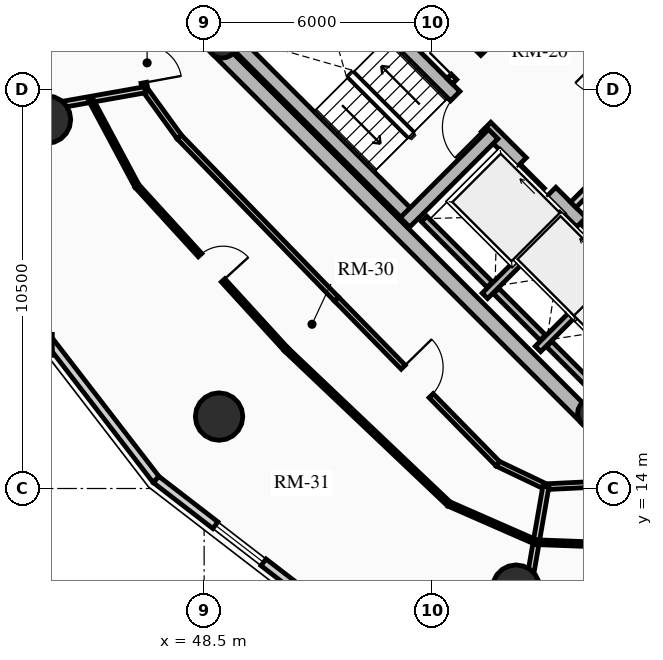
"""IFC4 building model, lengths in metres.
Left out: names, types, materials, properties, quantities, classifications, styles, units other than length and angle.
Written with IfcOpenShell. Run it as: python <this file> out.ifc"""

import sys

from ifc_helpers import new_model, si_unit, direction, frame, frame_2d, origin, origin_2d, place, context, subcontext, project, spatial, rectangle, circle, hollow_circle, extrude, source, transform, mapped, element, fill, save


model = new_model("IFC4")
c1 = context("Model", 3, precision=1e-05, world=origin(), true_north=direction((0.0, 1.0)))
c2 = subcontext(c1, "Body", "Model", "MODEL_VIEW")
j1 = project(units=[si_unit("LENGTHUNIT", "METRE"), si_unit("PLANEANGLEUNIT", "RADIAN")], contexts=[c1])
p1 = place(None, origin())
s1 = spatial("IfcSite", under=j1, at=p1, CompositionType="ELEMENT")
p2 = place(p1, origin())
s2 = spatial("IfcBuilding", under=s1, at=p2, CompositionType="ELEMENT")
p3 = place(p2, frame((0.0, 0.0, 160.33)))
s3 = spatial("IfcBuildingStorey", under=s2, at=p3, CompositionType="ELEMENT", Elevation=160.33)
for number, where, z_axis, x_axis in (
    (1, (58.702, 15.732, 0.0), (0.0, 0.0, 1.0), (-0.707, 0.707, 0.0)),
    (2, (66.268, 23.298, 0.0), (0.0, 0.0, 1.0), (-0.707, 0.707, 0.0)),
):
    element("IfcWall", number, at=place(p3, frame(where, z_axis=z_axis, x_axis=x_axis)), inside=s3, PredefinedType="SHEAR", context=c2, shape_type="SweptSolid", body=[
        extrude(rectangle(XDim=14.1, YDim=0.4, at=frame_2d((7.05, 0.0))), origin(), (0.0, 0.0, 1.0), 2.91),
    ])
p4 = place(p3, frame((58.561, 15.873, 0.0), z_axis=(0.0, 0.0, 1.0), x_axis=(0.707106781187, 0.707106781187, 0.0)))
e3 = element("IfcWall", 3, at=p4, inside=s3, PredefinedType="SHEAR", context=c2, shape_type="SweptSolid", body=[
    extrude(rectangle(XDim=10.7, YDim=0.4, at=frame_2d((5.35, 0.0))), origin(), (0.0, 0.0, 1.0), 2.91),
])
m1 = source(origin(), c2, "Body", "SweptSolid", [
    extrude(rectangle(XDim=1.5, YDim=2.02, at=frame_2d((0.75, 1.01))), frame((0.0, 0.21, 0.0), z_axis=(0.0, -1.0, 0.0), x_axis=(1.0, 0.0, 0.0)), (0.0, 0.0, 1.0), 0.42),
])
p5 = place(p4, frame((5.45, 0.0, 0.0)))
e4 = element("IfcOpeningElement", 4, at=p5, cuts=e3, PredefinedType="OPENING", context=c2, shape_type="MappedRepresentation", body=[
    mapped(m1, transform((0.0, 0.0, 0.0), x_axis=(1.0, 0.0, 0.0), y_axis=(0.0, 1.0, 0.0), z_axis=(0.0, 0.0, 1.0), scale=1.0)),
])
p6 = place(p3, frame((48.873, 25.561, 0.0), z_axis=(0.0, 0.0, 1.0), x_axis=(0.707106781187, 0.707106781187, 0.0)))
e5 = element("IfcWall", 5, at=p6, inside=s3, PredefinedType="SHEAR", context=c2, shape_type="SweptSolid", body=[
    extrude(rectangle(XDim=10.7, YDim=0.4, at=frame_2d((5.35, 0.0))), origin(), (0.0, 0.0, 1.0), 2.91),
])
p7 = place(p6, frame((4.6, 0.0, 0.0)))
e6 = element("IfcOpeningElement", 6, at=p7, cuts=e5, PredefinedType="OPENING", context=c2, shape_type="MappedRepresentation", body=[
    mapped(m1, transform((0.0, 0.0, 0.0), x_axis=(1.0, 0.0, 0.0), y_axis=(0.0, 1.0, 0.0), z_axis=(0.0, 0.0, 1.0), scale=1.0)),
])
p8 = place(p3, frame((61.06, 18.373, 0.0), z_axis=(0.0, 0.0, 1.0), x_axis=(-0.707106781187, 0.707106781187, 0.0)))
e7 = element("IfcWall", 7, at=p8, inside=s3, PredefinedType="SHEAR", context=c2, shape_type="SweptSolid", body=[
    extrude(rectangle(XDim=13.7, YDim=0.35, at=frame_2d((6.85, 0.0))), origin(), (0.0, 0.0, 1.0), 2.91),
])
m2 = source(origin(), c2, "Body", "SweptSolid", [
    extrude(rectangle(XDim=1.1, YDim=2.015, at=frame_2d((0.55, 1.007))), frame((0.0, 0.185, 0.0), z_axis=(0.0, -1.0, 0.0), x_axis=(1.0, 0.0, 0.0)), (0.0, 0.0, 1.0), 0.37),
])
p9 = place(p8, frame((4.85, 0.0, 0.0)))
e8 = element("IfcOpeningElement", 8, at=p9, cuts=e7, PredefinedType="OPENING", context=c2, shape_type="MappedRepresentation", body=[
    mapped(m2, transform((0.0, 0.0, 0.0), x_axis=(1.0, 0.0, 0.0), y_axis=(0.0, 1.0, 0.0), z_axis=(0.0, 0.0, 1.0), scale=1.0)),
])
p10 = place(p8, frame((0.625, 0.0, 0.0)))
e9 = element("IfcOpeningElement", 9, at=p10, cuts=e7, PredefinedType="OPENING", context=c2, shape_type="MappedRepresentation", body=[
    mapped(m2, transform((0.0, 0.0, 0.0), x_axis=(1.0, 0.0, 0.0), y_axis=(0.0, 1.0, 0.0), z_axis=(0.0, 0.0, 1.0), scale=1.0)),
])
p11 = place(p8, frame((2.625, 0.0, 0.0)))
e10 = element("IfcOpeningElement", 10, at=p11, cuts=e7, PredefinedType="OPENING", context=c2, shape_type="MappedRepresentation", body=[
    mapped(m2, transform((0.0, 0.0, 0.0), x_axis=(1.0, 0.0, 0.0), y_axis=(0.0, 1.0, 0.0), z_axis=(0.0, 0.0, 1.0), scale=1.0)),
])
m3 = source(origin(), c2, "Body", "SweptSolid", [
    extrude(rectangle(XDim=1.15, YDim=2.02, at=frame_2d((0.575, 1.01))), frame((0.0, 0.185, 0.0), z_axis=(0.0, -1.0, 0.0), x_axis=(1.0, 0.0, 0.0)), (0.0, 0.0, 1.0), 0.37),
])
p12 = place(p8, frame((7.27, 0.0, 0.0)))
e11 = element("IfcOpeningElement", 11, at=p12, cuts=e7, PredefinedType="OPENING", context=c2, shape_type="MappedRepresentation", body=[
    mapped(m3, transform((0.0, 0.0, 0.0), x_axis=(1.0, 0.0, 0.0), y_axis=(0.0, 1.0, 0.0), z_axis=(0.0, 0.0, 1.0), scale=1.0)),
])
p13 = place(p3, frame((63.627, 20.94, 0.0), z_axis=(0.0, 0.0, 1.0), x_axis=(-0.707119496762, 0.707094065383, 0.0)))
e12 = element("IfcWall", 12, at=p13, inside=s3, PredefinedType="SHEAR", context=c2, shape_type="SweptSolid", body=[
    extrude(rectangle(XDim=9.6, YDim=0.35, at=frame_2d((4.8, 0.0))), origin(), (0.0, 0.0, 1.0), 2.91),
])
p14 = place(p13, frame((5.28, 0.0, 0.0)))
e13 = element("IfcOpeningElement", 13, at=p14, cuts=e12, PredefinedType="OPENING", context=c2, shape_type="MappedRepresentation", body=[
    mapped(m3, transform((0.0, 0.0, 0.0), x_axis=(1.0, 0.0, 0.0), y_axis=(0.0, 1.0, 0.0), z_axis=(0.0, 0.0, 1.0), scale=1.0)),
])
p15 = place(p3, frame((53.922, 21.141, 0.0), z_axis=(0.0, 0.0, 1.0), x_axis=(-0.707106781187, 0.707106781187, 0.0)))
e14 = element("IfcWall", 14, at=p15, inside=s3, PredefinedType="SHEAR", context=c2, shape_type="SweptSolid", body=[
    extrude(rectangle(XDim=6.695, YDim=0.35, at=frame_2d((3.348, 0.0))), origin(), (0.0, 0.0, 1.0), 2.91),
])
p16 = place(p3, frame((53.784, 21.003, 0.0), z_axis=(0.0, 0.0, 1.0), x_axis=(0.707106781187, 0.707106781187, 0.0)))
e15 = element("IfcWall", 15, at=p16, inside=s3, PredefinedType="SHEAR", context=c2, shape_type="SweptSolid", body=[
    extrude(rectangle(XDim=3.285, YDim=0.35, at=frame_2d((1.643, 0.0))), origin(), (0.0, 0.0, 1.0), 2.91),
])
for number, where, z_axis, x_axis in (
    (16, (58.706, 15.976, 0.0), (0.0, 0.0, 1.0), (0.707, 0.707, 0.0)),
    (17, (48.976, 25.706, 0.0), (0.0, 0.0, 1.0), (0.707, 0.707, 0.0)),
):
    element("IfcColumn", number, at=place(p3, frame(where, z_axis=z_axis, x_axis=x_axis)), inside=s3, PredefinedType="COLUMN", context=c2, shape_type="SweptSolid", body=[
        extrude(hollow_circle(Radius=0.38, WallThickness=0.032, at=origin_2d()), origin(), (0.0, 0.0, 1.0), 2.91),
    ])
for number, where, z_axis, x_axis in (
    (18, (44.365, 23.709, 0.0), (0.0, 0.0, 1.0), (1.0, 0.0, 0.0)),
    (19, (48.893, 15.893, 0.0), (0.0, 0.0, 1.0), (1.0, 0.0, 0.0)),
    (20, (56.709, 11.365, 0.0), (0.0, 0.0, 1.0), (1.0, 0.0, 0.0)),
):
    element("IfcColumn", number, at=place(p3, frame(where, z_axis=z_axis, x_axis=x_axis)), inside=s3, PredefinedType="USERDEFINED", context=c2, shape_type="SweptSolid", body=[
        extrude(circle(Radius=0.625, at=origin_2d()), origin(), (0.0, 0.0, 1.0), 2.91),
    ])
p17 = place(p3, frame((47.236, 14.236, 0.0), z_axis=(0.0, 0.0, 1.0), x_axis=(-0.610543584779, 0.791982658323, 0.0)))
e21 = element("IfcWall", 21, at=p17, inside=s3, PredefinedType="SOLIDWALL", context=c2, shape_type="SweptSolid", body=[
    extrude(rectangle(XDim=5.537, YDim=0.22, at=frame_2d((2.769, 0.0))), origin(), (0.0, 0.0, 1.0), 2.245),
])
p18 = place(p3, frame((51.622, 10.856, 0.0), z_axis=(0.0, 0.0, 1.0), x_axis=(-0.791982658323, 0.610543584779, 0.0)))
e22 = element("IfcWall", 22, at=p18, inside=s3, PredefinedType="SOLIDWALL", context=c2, shape_type="SweptSolid", body=[
    extrude(rectangle(XDim=5.537, YDim=0.22, at=frame_2d((2.769, 0.0))), origin(), (0.0, 0.0, 1.0), 2.245),
])
m4 = source(origin(), c2, "Body", "SweptSolid", [
    extrude(rectangle(XDim=1.6, YDim=1.3, at=frame_2d((0.8, 0.65))), frame((0.0, 0.12, 0.0), z_axis=(0.0, -1.0, 0.0), x_axis=(1.0, 0.0, 0.0)), (0.0, 0.0, 1.0), 0.24),
])
p19 = place(p18, frame((1.968, 0.0, 0.65)))
e23 = element("IfcOpeningElement", 23, at=p19, cuts=e22, PredefinedType="OPENING", context=c2, shape_type="MappedRepresentation", body=[
    mapped(m4, transform((0.0, 0.0, 0.0), x_axis=(1.0, 0.0, 0.0), y_axis=(0.0, 1.0, 0.0), z_axis=(0.0, 0.0, 1.0), scale=1.0)),
])
p20 = place(p3, frame((55.888, 19.069, 0.0), z_axis=(0.0, 0.0, 1.0), x_axis=(0.707106781187, 0.707106781187, 0.0)))
e24 = element("IfcWall", 24, at=p20, inside=s3, PredefinedType="SHEAR", context=c2, shape_type="SweptSolid", body=[
    extrude(rectangle(XDim=2.97, YDim=0.2, at=frame_2d((1.485, 0.0))), origin(), (0.0, 0.0, 1.0), 2.91),
])
p21 = place(p3, frame((56.015, 19.366, 0.0), z_axis=(0.0, 0.0, 1.0), x_axis=(-0.707106781187, 0.707106781187, 0.0)))
e25 = element("IfcWall", 25, at=p21, inside=s3, PredefinedType="SHEAR", context=c2, shape_type="SweptSolid", body=[
    extrude(rectangle(XDim=2.44, YDim=0.2, at=frame_2d((1.22, 0.0))), origin(), (0.0, 0.0, 1.0), 2.91),
])
p22 = place(p3, frame((57.284, 17.673, 0.0), z_axis=(0.0, 0.0, 1.0), x_axis=(0.707147878904, 0.70706568108, 0.0)))
e26 = element("IfcWall", 26, at=p22, inside=s3, PredefinedType="SHEAR", context=c2, shape_type="SweptSolid", body=[
    extrude(rectangle(XDim=2.97, YDim=0.2, at=frame_2d((1.485, 0.0))), origin(), (0.0, 0.0, 1.0), 2.91),
])
p23 = place(p3, frame((57.412, 17.97, 0.0), z_axis=(0.0, 0.0, 1.0), x_axis=(-0.707106781187, 0.707106781187, 0.0)))
e27 = element("IfcWall", 27, at=p23, inside=s3, PredefinedType="SHEAR", context=c2, shape_type="SweptSolid", body=[
    extrude(rectangle(XDim=1.735, YDim=0.2, at=frame_2d((0.867, 0.0))), origin(), (0.0, 0.0, 1.0), 2.91),
])
p24 = place(p3, frame((58.737, 16.644, 0.0), z_axis=(0.0, 0.0, 1.0), x_axis=(-0.707032117043, 0.707181437447, 0.0)))
e28 = element("IfcWall", 28, at=p24, inside=s3, PredefinedType="SHEAR", context=c2, shape_type="SweptSolid", body=[
    extrude(rectangle(XDim=1.635, YDim=0.2, at=frame_2d((0.817, 0.0))), origin(), (0.0, 0.0, 1.0), 2.91),
])
p25 = place(p3, frame((58.214, 21.467, 0.0), z_axis=(0.0, 0.0, 1.0), x_axis=(0.707106781187, 0.707106781187, 0.0)))
e29 = element("IfcWall", 29, at=p25, inside=s3, PredefinedType="PARTITIONING", context=c2, shape_type="SweptSolid", body=[
    extrude(rectangle(XDim=3.28, YDim=0.2, at=frame_2d((1.64, 0.0))), origin(), (0.0, 0.0, 1.0), 2.675),
])
m5 = source(origin(), c2, "Body", "SweptSolid", [
    extrude(rectangle(XDim=1.5, YDim=2.02, at=frame_2d((0.75, 1.01))), frame((0.0, 0.11, 0.0), z_axis=(0.0, -1.0, 0.0), x_axis=(1.0, 0.0, 0.0)), (0.0, 0.0, 1.0), 0.22),
])
p26 = place(p25, frame((1.55, 0.0, 0.0)))
e30 = element("IfcOpeningElement", 30, at=p26, cuts=e29, PredefinedType="OPENING", context=c2, shape_type="MappedRepresentation", body=[
    mapped(m5, transform((0.0, 0.0, 0.0), x_axis=(1.0, 0.0, 0.0), y_axis=(0.0, 1.0, 0.0), z_axis=(0.0, 0.0, 1.0), scale=1.0)),
])
p27 = place(p3, frame((54.961, 24.719, 0.0), z_axis=(0.0, 0.0, 1.0), x_axis=(0.707106781187, 0.707106781187, 0.0)))
e31 = element("IfcWall", 31, at=p27, inside=s3, PredefinedType="PARTITIONING", context=c2, shape_type="SweptSolid", body=[
    extrude(rectangle(XDim=3.28, YDim=0.2, at=frame_2d((1.64, 0.0))), origin(), (0.0, 0.0, 1.0), 2.675),
])
m6 = source(origin(), c2, "Body", "SweptSolid", [
    extrude(rectangle(XDim=0.9, YDim=2.005, at=frame_2d((0.45, 1.002))), frame((0.0, 0.11, 0.0), z_axis=(0.0, -1.0, 0.0), x_axis=(1.0, 0.0, 0.0)), (0.0, 0.0, 1.0), 0.22),
])
p28 = place(p27, frame((0.16, 0.0, 0.0)))
e32 = element("IfcOpeningElement", 32, at=p28, cuts=e31, PredefinedType="OPENING", context=c2, shape_type="MappedRepresentation", body=[
    mapped(m6, transform((0.0, 0.0, 0.0), x_axis=(1.0, 0.0, 0.0), y_axis=(0.0, 1.0, 0.0), z_axis=(0.0, 0.0, 1.0), scale=1.0)),
])
p29 = place(p3, frame((46.699, 25.843, 0.0), z_axis=(0.0, 0.0, 1.0), x_axis=(0.180451258011, -0.983583928032, 0.0)))
e33 = element("IfcWall", 33, at=p29, inside=s3, PredefinedType="PARTITIONING", context=c2, shape_type="SweptSolid", body=[
    extrude(rectangle(XDim=1.372, YDim=0.15, at=frame_2d((0.686, 0.0))), origin(), (0.0, 0.0, 1.0), 2.245),
])
m7 = source(origin(), c2, "Body", "SweptSolid", [
    extrude(rectangle(XDim=1.0, YDim=2.015, at=frame_2d((0.5, 1.007))), frame((0.0, 0.085, 0.0), z_axis=(0.0, -1.0, 0.0), x_axis=(1.0, 0.0, 0.0)), (0.0, 0.0, 1.0), 0.17),
])
p30 = place(p29, frame((0.186, 0.0, 0.0)))
e34 = element("IfcOpeningElement", 34, at=p30, cuts=e33, PredefinedType="OPENING", context=c2, shape_type="MappedRepresentation", body=[
    mapped(m7, transform((0.0, 0.0, 0.0), x_axis=(1.0, 0.0, 0.0), y_axis=(0.0, 1.0, 0.0), z_axis=(0.0, 0.0, 1.0), scale=1.0)),
])
p31 = place(p3, frame((46.946, 24.494, 0.0), z_axis=(0.0, 0.0, 1.0), x_axis=(0.586340262528, -0.810064871809, 0.0)))
e35 = element("IfcWall", 35, at=p31, inside=s3, PredefinedType="PARTITIONING", context=c2, shape_type="SweptSolid", body=[
    extrude(rectangle(XDim=1.531, YDim=0.15, at=frame_2d((0.766, 0.0))), origin(), (0.0, 0.0, 1.0), 2.245),
])
p32 = place(p3, frame((47.844, 23.253, 0.0), z_axis=(0.0, 0.0, 1.0), x_axis=(0.696248411352, -0.717800912293, 0.0)))
e36 = element("IfcWall", 36, at=p32, inside=s3, PredefinedType="PARTITIONING", context=c2, shape_type="SweptSolid", body=[
    extrude(rectangle(XDim=5.947, YDim=0.15, at=frame_2d((2.974, 0.0))), origin(), (0.0, 0.0, 1.0), 2.675),
])
p33 = place(p3, frame((51.985, 18.985, 0.0), z_axis=(0.0, 0.0, 1.0), x_axis=(0.699619654291, -0.714515457726, 0.0)))
e37 = element("IfcWall", 37, at=p33, inside=s3, PredefinedType="PARTITIONING", context=c2, shape_type="SweptSolid", body=[
    extrude(rectangle(XDim=6.064, YDim=0.15, at=frame_2d((3.032, 0.0))), origin(), (0.0, 0.0, 1.0), 2.245),
])
m8 = source(origin(), c2, "Body", "SweptSolid", [
    extrude(rectangle(XDim=1.05, YDim=2.015, at=frame_2d((0.525, 1.007))), frame((0.0, 0.085, 0.0), z_axis=(0.0, -1.0, 0.0), x_axis=(1.0, 0.0, 0.0)), (0.0, 0.0, 1.0), 0.17),
])
p34 = place(p33, frame((2.507, 0.0, 0.0)))
e38 = element("IfcOpeningElement", 38, at=p34, cuts=e37, PredefinedType="OPENING", context=c2, shape_type="MappedRepresentation", body=[
    mapped(m8, transform((0.0, 0.0, 0.0), x_axis=(1.0, 0.0, 0.0), y_axis=(0.0, 1.0, 0.0), z_axis=(0.0, 0.0, 1.0), scale=1.0)),
])
p35 = place(p3, frame((56.227, 14.652, 0.0), z_axis=(0.0, 0.0, 1.0), x_axis=(0.902364039563, -0.430974639745, 0.0)))
e39 = element("IfcWall", 39, at=p35, inside=s3, PredefinedType="PARTITIONING", context=c2, shape_type="SweptSolid", body=[
    extrude(rectangle(XDim=1.401, YDim=0.15, at=frame_2d((0.701, 0.0))), origin(), (0.0, 0.0, 1.0), 2.245),
])
p36 = place(p3, frame((57.492, 14.048, 0.0), z_axis=(0.0, 0.0, 1.0), x_axis=(0.99885011351, 0.047942160364, 0.0)))
e40 = element("IfcWall", 40, at=p36, inside=s3, PredefinedType="PARTITIONING", context=c2, shape_type="SweptSolid", body=[
    extrude(rectangle(XDim=1.477, YDim=0.15, at=frame_2d((0.738, 0.0))), origin(), (0.0, 0.0, 1.0), 2.245),
])
p37 = place(p3, frame((46.946, 24.494, 0.0), z_axis=(0.0, 0.0, 1.0), x_axis=(-0.984604227647, -0.174798497988, 0.0)))
e41 = element("IfcWall", 41, at=p37, inside=s3, PredefinedType="PARTITIONING", context=c2, shape_type="SweptSolid", body=[
    extrude(rectangle(XDim=5.196, YDim=0.16, at=frame_2d((2.598, 0.0))), origin(), (0.0, 0.0, 1.0), 2.245),
])
p38 = place(p3, frame((57.492, 14.048, 0.0), z_axis=(0.0, 0.0, 1.0), x_axis=(-0.171191349619, -0.985237799628, 0.0)))
e42 = element("IfcWall", 42, at=p38, inside=s3, PredefinedType="PARTITIONING", context=c2, shape_type="SweptSolid", body=[
    extrude(rectangle(XDim=5.295, YDim=0.16, at=frame_2d((2.647, 0.0))), origin(), (0.0, 0.0, 1.0), 2.245),
])
p39 = place(p3, frame((45.514, 24.239, 0.0), z_axis=(0.0, 0.0, 1.0), x_axis=(0.471225296528, -0.882012879674, 0.0)))
e43 = element("IfcWall", 43, at=p39, inside=s3, PredefinedType="PARTITIONING", context=c2, shape_type="SweptSolid", body=[
    extrude(rectangle(XDim=2.585, YDim=0.125, at=frame_2d((1.292, 0.0))), origin(), (0.0, 0.0, 1.0), 2.245),
])
p40 = place(p3, frame((46.732, 21.959, 0.0), z_axis=(0.0, 0.0, 1.0), x_axis=(0.674328014222, -0.738431939474, 0.0)))
e44 = element("IfcWall", 44, at=p40, inside=s3, PredefinedType="PARTITIONING", context=c2, shape_type="SweptSolid", body=[
    extrude(rectangle(XDim=5.823, YDim=0.125, at=frame_2d((2.912, 0.0))), origin(), (0.0, 0.0, 1.0), 2.675),
])
m9 = source(origin(), c2, "Body", "SweptSolid", [
    extrude(rectangle(XDim=0.9, YDim=2.005, at=frame_2d((0.45, 1.002))), frame((0.0, 0.073, 0.0), z_axis=(0.0, -1.0, 0.0), x_axis=(1.0, 0.0, 0.0)), (0.0, 0.0, 1.0), 0.145),
])
p41 = place(p40, frame((2.462, 0.0, 0.0)))
e45 = element("IfcOpeningElement", 45, at=p41, cuts=e44, PredefinedType="OPENING", context=c2, shape_type="MappedRepresentation", body=[
    mapped(m9, transform((0.0, 0.0, 0.0), x_axis=(1.0, 0.0, 0.0), y_axis=(0.0, 1.0, 0.0), z_axis=(0.0, 0.0, 1.0), scale=1.0)),
])
p42 = place(p3, frame((50.659, 17.659, 0.0), z_axis=(0.0, 0.0, 1.0), x_axis=(0.72516873678, -0.688571204159, 0.0)))
e46 = element("IfcWall", 46, at=p42, inside=s3, PredefinedType="PARTITIONING", context=c2, shape_type="SweptSolid", body=[
    extrude(rectangle(XDim=5.904, YDim=0.125, at=frame_2d((2.952, 0.0))), origin(), (0.0, 0.0, 1.0), 2.245),
])
p43 = place(p3, frame((54.94, 13.594, 0.0), z_axis=(0.0, 0.0, 1.0), x_axis=(0.915898070967, -0.401410916143, 0.0)))
e47 = element("IfcWall", 47, at=p43, inside=s3, PredefinedType="PARTITIONING", context=c2, shape_type="SweptSolid", body=[
    extrude(rectangle(XDim=2.509, YDim=0.125, at=frame_2d((1.254, 0.0))), origin(), (0.0, 0.0, 1.0), 2.245),
])
p44 = place(p3, frame((57.238, 12.587, 0.0), z_axis=(0.0, 0.0, 1.0), x_axis=(0.999316318576, -0.036971548882, 0.0)))
e48 = element("IfcWall", 48, at=p44, inside=s3, PredefinedType="PARTITIONING", context=c2, shape_type="SweptSolid", body=[
    extrude(rectangle(XDim=2.476, YDim=0.125, at=frame_2d((1.238, 0.0))), origin(), (0.0, 0.0, 1.0), 2.245),
])
m10 = source(origin(), c2, "Body", "SweptSolid", [
    extrude(rectangle(XDim=1.6, YDim=1.3, at=frame_2d((0.8, 0.65))), frame((0.0, 0.03, 0.0), z_axis=(0.0, -1.0, 0.0), x_axis=(1.0, 0.0, 0.0)), (0.0, 0.0, 1.0), 0.06),
])
p45 = place(p19, origin())
e49 = element("IfcWindow", 49, at=p45, inside=s3, PartitioningType="SINGLE_PANEL", PredefinedType="WINDOW", context=c2, shape_type="MappedRepresentation", body=[
    mapped(m10, transform((0.0, 0.0, 0.0), x_axis=(1.0, 0.0, 0.0), y_axis=(0.0, 1.0, 0.0), z_axis=(0.0, 0.0, 1.0), scale=1.0)),
])
fill(e23, e49)
m11 = source(origin(), c2, "Body", "SweptSolid", [
    extrude(rectangle(XDim=1.1, YDim=2.015, at=frame_2d((0.55, 1.007))), frame((0.0, 0.025, 0.0), z_axis=(0.0, -1.0, 0.0), x_axis=(1.0, 0.0, 0.0)), (0.0, 0.0, 1.0), 0.05),
])
p46 = place(p9, origin())
e50 = element("IfcDoor", 50, at=p46, inside=s3, OperationType="SLIDING_TO_RIGHT", PredefinedType="DOOR", context=c2, shape_type="MappedRepresentation", body=[
    mapped(m11, transform((0.0, 0.0, 0.0), x_axis=(1.0, 0.0, 0.0), y_axis=(0.0, 1.0, 0.0), z_axis=(0.0, 0.0, 1.0), scale=1.0)),
])
fill(e8, e50)
p47 = place(p11, origin())
e51 = element("IfcDoor", 51, at=p47, inside=s3, OperationType="SLIDING_TO_RIGHT", PredefinedType="DOOR", context=c2, shape_type="MappedRepresentation", body=[
    mapped(m11, transform((0.0, 0.0, 0.0), x_axis=(1.0, 0.0, 0.0), y_axis=(0.0, 1.0, 0.0), z_axis=(0.0, 0.0, 1.0), scale=1.0)),
])
fill(e10, e51)
m12 = source(origin(), c2, "Body", "SweptSolid", [
    extrude(rectangle(XDim=1.15, YDim=2.02, at=frame_2d((0.575, 1.01))), frame((0.0, 0.025, 0.0), z_axis=(0.0, -1.0, 0.0), x_axis=(1.0, 0.0, 0.0)), (0.0, 0.0, 1.0), 0.05),
])
p48 = place(p12, origin())
e52 = element("IfcDoor", 52, at=p48, inside=s3, OperationType="SINGLE_SWING_LEFT", PredefinedType="DOOR", context=c2, shape_type="MappedRepresentation", body=[
    mapped(m12, transform((0.0, 0.0, 0.0), x_axis=(1.0, 0.0, 0.0), y_axis=(0.0, 1.0, 0.0), z_axis=(0.0, 0.0, 1.0), scale=1.0)),
])
fill(e11, e52)
m13 = source(origin(), c2, "Body", "SweptSolid", [
    extrude(rectangle(XDim=0.9, YDim=2.005, at=frame_2d((0.45, 1.002))), frame((0.0, 0.025, 0.0), z_axis=(0.0, -1.0, 0.0), x_axis=(1.0, 0.0, 0.0)), (0.0, 0.0, 1.0), 0.05),
])
p49 = place(p28, origin())
e53 = element("IfcDoor", 53, at=p49, inside=s3, OperationType="SINGLE_SWING_LEFT", PredefinedType="DOOR", context=c2, shape_type="MappedRepresentation", body=[
    mapped(m13, transform((0.0, 0.0, 0.0), x_axis=(1.0, 0.0, 0.0), y_axis=(0.0, 1.0, 0.0), z_axis=(0.0, 0.0, 1.0), scale=1.0)),
])
fill(e32, e53)
m14 = source(origin(), c2, "Body", "SweptSolid", [
    extrude(rectangle(XDim=1.0, YDim=2.015, at=frame_2d((0.5, 1.007))), frame((0.0, 0.025, 0.0), z_axis=(0.0, -1.0, 0.0), x_axis=(1.0, 0.0, 0.0)), (0.0, 0.0, 1.0), 0.05),
])
p50 = place(p30, origin())
e54 = element("IfcDoor", 54, at=p50, inside=s3, OperationType="SINGLE_SWING_RIGHT", PredefinedType="DOOR", context=c2, shape_type="MappedRepresentation", body=[
    mapped(m14, transform((0.0, 0.0, 0.0), x_axis=(1.0, 0.0, 0.0), y_axis=(0.0, 1.0, 0.0), z_axis=(0.0, 0.0, 1.0), scale=1.0)),
])
fill(e34, e54)
m15 = source(origin(), c2, "Body", "SweptSolid", [
    extrude(rectangle(XDim=1.05, YDim=2.015, at=frame_2d((0.525, 1.007))), frame((0.0, 0.025, 0.0), z_axis=(0.0, -1.0, 0.0), x_axis=(1.0, 0.0, 0.0)), (0.0, 0.0, 1.0), 0.05),
])
p51 = place(p34, origin())
e55 = element("IfcDoor", 55, at=p51, inside=s3, OperationType="SINGLE_SWING_LEFT", PredefinedType="DOOR", context=c2, shape_type="MappedRepresentation", body=[
    mapped(m15, transform((0.0, 0.0, 0.0), x_axis=(1.0, 0.0, 0.0), y_axis=(0.0, 1.0, 0.0), z_axis=(0.0, 0.0, 1.0), scale=1.0)),
])
fill(e38, e55)
p52 = place(p41, origin())
e56 = element("IfcDoor", 56, at=p52, inside=s3, OperationType="SINGLE_SWING_RIGHT", PredefinedType="DOOR", context=c2, shape_type="MappedRepresentation", body=[
    mapped(m13, transform((0.0, 0.0, 0.0), x_axis=(1.0, 0.0, 0.0), y_axis=(0.0, 1.0, 0.0), z_axis=(0.0, 0.0, 1.0), scale=1.0)),
])
fill(e45, e56)
save(model, sys.argv[1])
